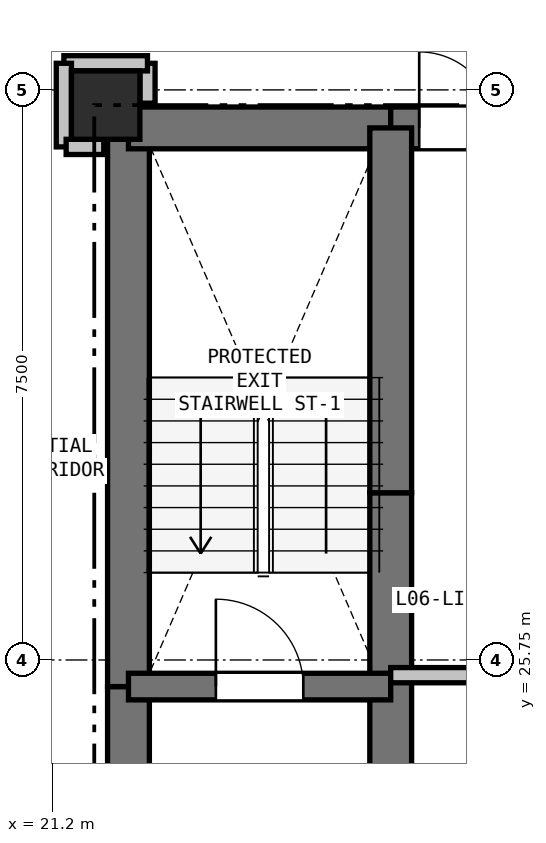
"""IFC4 building model, lengths in metres.
Left out: names, types, materials, properties, quantities, classifications, styles, units other than length and angle.
Written with IfcOpenShell. Run it as: python <this file> out.ifc"""

import sys

from ifc_helpers import new_model, si_unit, direction, frame, frame_2d, origin, origin_2d, place, context, subcontext, project, spatial, rectangle, extrude, element, fill, save


model = new_model("IFC4")
c1 = context("Model", 3, precision=1e-05, world=origin(), true_north=direction((0.0, 1.0)))
c2 = subcontext(c1, "Body", "Model", "MODEL_VIEW")
j1 = project(units=[si_unit("LENGTHUNIT", "METRE"), si_unit("PLANEANGLEUNIT", "RADIAN")], contexts=[c1])
p1 = place(None, origin())
s1 = spatial("IfcSite", under=j1, at=p1, CompositionType="ELEMENT")
p2 = place(p1, origin())
s2 = spatial("IfcBuilding", under=s1, at=p2, CompositionType="ELEMENT")
p3 = place(p2, frame((0.0, 0.0, 25.8)))
s3 = spatial("IfcBuildingStorey", under=s2, at=p3, CompositionType="ELEMENT", Elevation=25.8)
p4 = place(p3, frame((21.9, 33.05, 0.0), z_axis=(0.0, 0.0, 1.0), x_axis=(1.0, 0.0, 0.0)))
e1 = element("IfcColumn", 1, at=p4, inside=s3, PredefinedType="COLUMN", context=c2, shape_type="SweptSolid", body=[
    extrude(rectangle(XDim=0.9, YDim=0.9, at=origin_2d()), origin(), (0.0, 0.0, 1.0), 3.3),
])
p5 = place(p3, frame((22.2, 20.75, 0.0), z_axis=(0.0, 0.0, 1.0), x_axis=(0.0, 1.0, 0.0)))
e2 = element("IfcWall", 2, at=p5, inside=s3, PredefinedType="SHEAR", context=c2, shape_type="SweptSolid", body=[
    extrude(rectangle(XDim=4.65, YDim=0.55, at=frame_2d((2.325, 0.0))), origin(), (0.0, 0.0, 1.0), 3.04),
])
p6 = place(p3, frame((22.2, 25.4, 0.0), z_axis=(0.0, 0.0, 1.0), x_axis=(0.0, 1.0, 0.0)))
e3 = element("IfcWall", 3, at=p6, inside=s3, PredefinedType="SHEAR", context=c2, shape_type="SweptSolid", body=[
    extrude(rectangle(XDim=7.35, YDim=0.55, at=frame_2d((3.675, 0.0))), origin(), (0.0, 0.0, 1.0), 3.04),
])
p7 = place(p3, frame((22.2, 32.75, 0.0), z_axis=(0.0, 0.0, 1.0), x_axis=(1.0, 0.0, 0.0)))
e4 = element("IfcWall", 4, at=p7, inside=s3, PredefinedType="SHEAR", context=c2, shape_type="SweptSolid", body=[
    extrude(rectangle(XDim=3.45, YDim=0.55, at=frame_2d((1.725, 0.0))), origin(), (0.0, 0.0, 1.0), 3.04),
])
p8 = place(p3, frame((25.65, 32.75, 0.0), z_axis=(0.0, 0.0, 1.0), x_axis=(1.0, 0.0, 0.0)))
e5 = element("IfcWall", 5, at=p8, inside=s3, PredefinedType="SHEAR", context=c2, shape_type="SweptSolid", body=[
    extrude(rectangle(XDim=1.75, YDim=0.55, at=frame_2d((0.875, 0.0))), origin(), (0.0, 0.0, 1.0), 3.04),
])
p9 = place(p8, frame((0.375, 0.0, 0.0)))
e6 = element("IfcOpeningElement", 6, at=p9, cuts=e5, PredefinedType="OPENING", context=c2, shape_type="SweptSolid", body=[
    extrude(rectangle(XDim=1.0, YDim=2.15, at=frame_2d((0.5, 1.075))), frame((0.0, 0.285, 0.0), z_axis=(0.0, -1.0, 0.0), x_axis=(1.0, 0.0, 0.0)), (0.0, 0.0, 1.0), 0.57),
])
p10 = place(p3, frame((25.65, 22.75, 0.0), z_axis=(0.0, 0.0, 1.0), x_axis=(0.0, 1.0, 0.0)))
e7 = element("IfcWall", 7, at=p10, inside=s3, PredefinedType="SHEAR", context=c2, shape_type="SweptSolid", body=[
    extrude(rectangle(XDim=2.8, YDim=0.55, at=frame_2d((1.4, 0.0))), origin(), (0.0, 0.0, 1.0), 3.04),
])
p11 = place(p3, frame((25.65, 25.55, 0.0), z_axis=(0.0, 0.0, 1.0), x_axis=(0.0, 1.0, 0.0)))
e8 = element("IfcWall", 8, at=p11, inside=s3, PredefinedType="SHEAR", context=c2, shape_type="SweptSolid", body=[
    extrude(rectangle(XDim=2.4, YDim=0.55, at=frame_2d((1.2, 0.0))), origin(), (0.0, 0.0, 1.0), 3.04),
])
p12 = place(p3, frame((25.65, 27.95, 0.0), z_axis=(0.0, 0.0, 1.0), x_axis=(0.0, 1.0, 0.0)))
e9 = element("IfcWall", 9, at=p12, inside=s3, PredefinedType="SHEAR", context=c2, shape_type="SweptSolid", body=[
    extrude(rectangle(XDim=4.8, YDim=0.55, at=frame_2d((2.4, 0.0))), origin(), (0.0, 0.0, 1.0), 3.04),
])
p13 = place(p3, frame((22.2, 25.4, 0.0), z_axis=(0.0, 0.0, 1.0), x_axis=(1.0, 0.0, 0.0)))
e10 = element("IfcWall", 10, at=p13, inside=s3, PredefinedType="SHEAR", context=c2, shape_type="SweptSolid", body=[
    extrude(rectangle(XDim=3.45, YDim=0.35, at=frame_2d((1.725, 0.0))), origin(), (0.0, 0.0, 1.0), 3.04),
])
p14 = place(p13, frame((1.15, 0.0, 0.0)))
e11 = element("IfcOpeningElement", 11, at=p14, cuts=e10, PredefinedType="OPENING", context=c2, shape_type="SweptSolid", body=[
    extrude(rectangle(XDim=1.15, YDim=2.15, at=frame_2d((0.575, 1.075))), frame((0.0, 0.185, 0.0), z_axis=(0.0, -1.0, 0.0), x_axis=(1.0, 0.0, 0.0)), (0.0, 0.0, 1.0), 0.37),
])
p15 = place(p3, frame((25.65, 25.55, 0.0), z_axis=(0.0, 0.0, 1.0), x_axis=(1.0, 0.0, 0.0)))
e12 = element("IfcWall", 12, at=p15, inside=s3, PredefinedType="PARTITIONING", context=c2, shape_type="SweptSolid", body=[
    extrude(rectangle(XDim=4.95, YDim=0.2, at=frame_2d((2.475, 0.0))), origin(), (0.0, 0.0, 1.0), 3.04),
])
p16 = place(p3, frame((22.45, 33.075, 0.0), z_axis=(0.0, 0.0, 1.0), x_axis=(0.0, 1.0, 0.0)))
e13 = element("IfcWall", 13, at=p16, inside=s3, PredefinedType="PARTITIONING", context=c2, shape_type="SweptSolid", body=[
    extrude(rectangle(XDim=0.525, YDim=0.2, at=frame_2d((0.263, 0.0))), origin(), (0.0, 0.0, 1.0), 2.488),
])
p17 = place(p3, frame((22.45, 33.6, 0.0), z_axis=(0.0, 0.0, 1.0), x_axis=(-1.0, 0.0, 0.0)))
e14 = element("IfcWall", 14, at=p17, inside=s3, PredefinedType="PARTITIONING", context=c2, shape_type="SweptSolid", body=[
    extrude(rectangle(XDim=1.1, YDim=0.2, at=frame_2d((0.55, 0.0))), origin(), (0.0, 0.0, 1.0), 3.04),
])
p18 = place(p3, frame((21.35, 33.6, 0.0), z_axis=(0.0, 0.0, 1.0), x_axis=(0.0, -1.0, 0.0)))
e15 = element("IfcWall", 15, at=p18, inside=s3, PredefinedType="PARTITIONING", context=c2, shape_type="SweptSolid", body=[
    extrude(rectangle(XDim=1.1, YDim=0.2, at=frame_2d((0.55, 0.0))), origin(), (0.0, 0.0, 1.0), 2.337),
])
p19 = place(p3, frame((21.38, 32.5, 0.0), z_axis=(0.0, 0.0, 1.0), x_axis=(1.0, 0.0, 0.0)))
e16 = element("IfcWall", 16, at=p19, inside=s3, PredefinedType="PARTITIONING", context=c2, shape_type="SweptSolid", body=[
    extrude(rectangle(XDim=0.495, YDim=0.2, at=frame_2d((0.248, 0.0))), origin(), (0.0, 0.0, 1.0), 2.488),
])
p20 = place(p9, origin())
e17 = element("IfcDoor", 17, at=p20, inside=s3, OperationType="SINGLE_SWING_LEFT", PredefinedType="DOOR", context=c2, shape_type="SweptSolid", body=[
    extrude(rectangle(XDim=1.0, YDim=2.15, at=frame_2d((0.5, 1.075))), frame((0.0, 0.025, 0.0), z_axis=(0.0, -1.0, 0.0), x_axis=(1.0, 0.0, 0.0)), (0.0, 0.0, 1.0), 0.05),
])
fill(e6, e17)
p21 = place(p14, origin())
e18 = element("IfcDoor", 18, at=p21, inside=s3, OperationType="SINGLE_SWING_LEFT", PredefinedType="DOOR", context=c2, shape_type="SweptSolid", body=[
    extrude(rectangle(XDim=1.15, YDim=2.15, at=frame_2d((0.575, 1.075))), frame((0.0, 0.025, 0.0), z_axis=(0.0, -1.0, 0.0), x_axis=(1.0, 0.0, 0.0)), (0.0, 0.0, 1.0), 0.05),
])
fill(e11, e18)
save(model, sys.argv[1])
